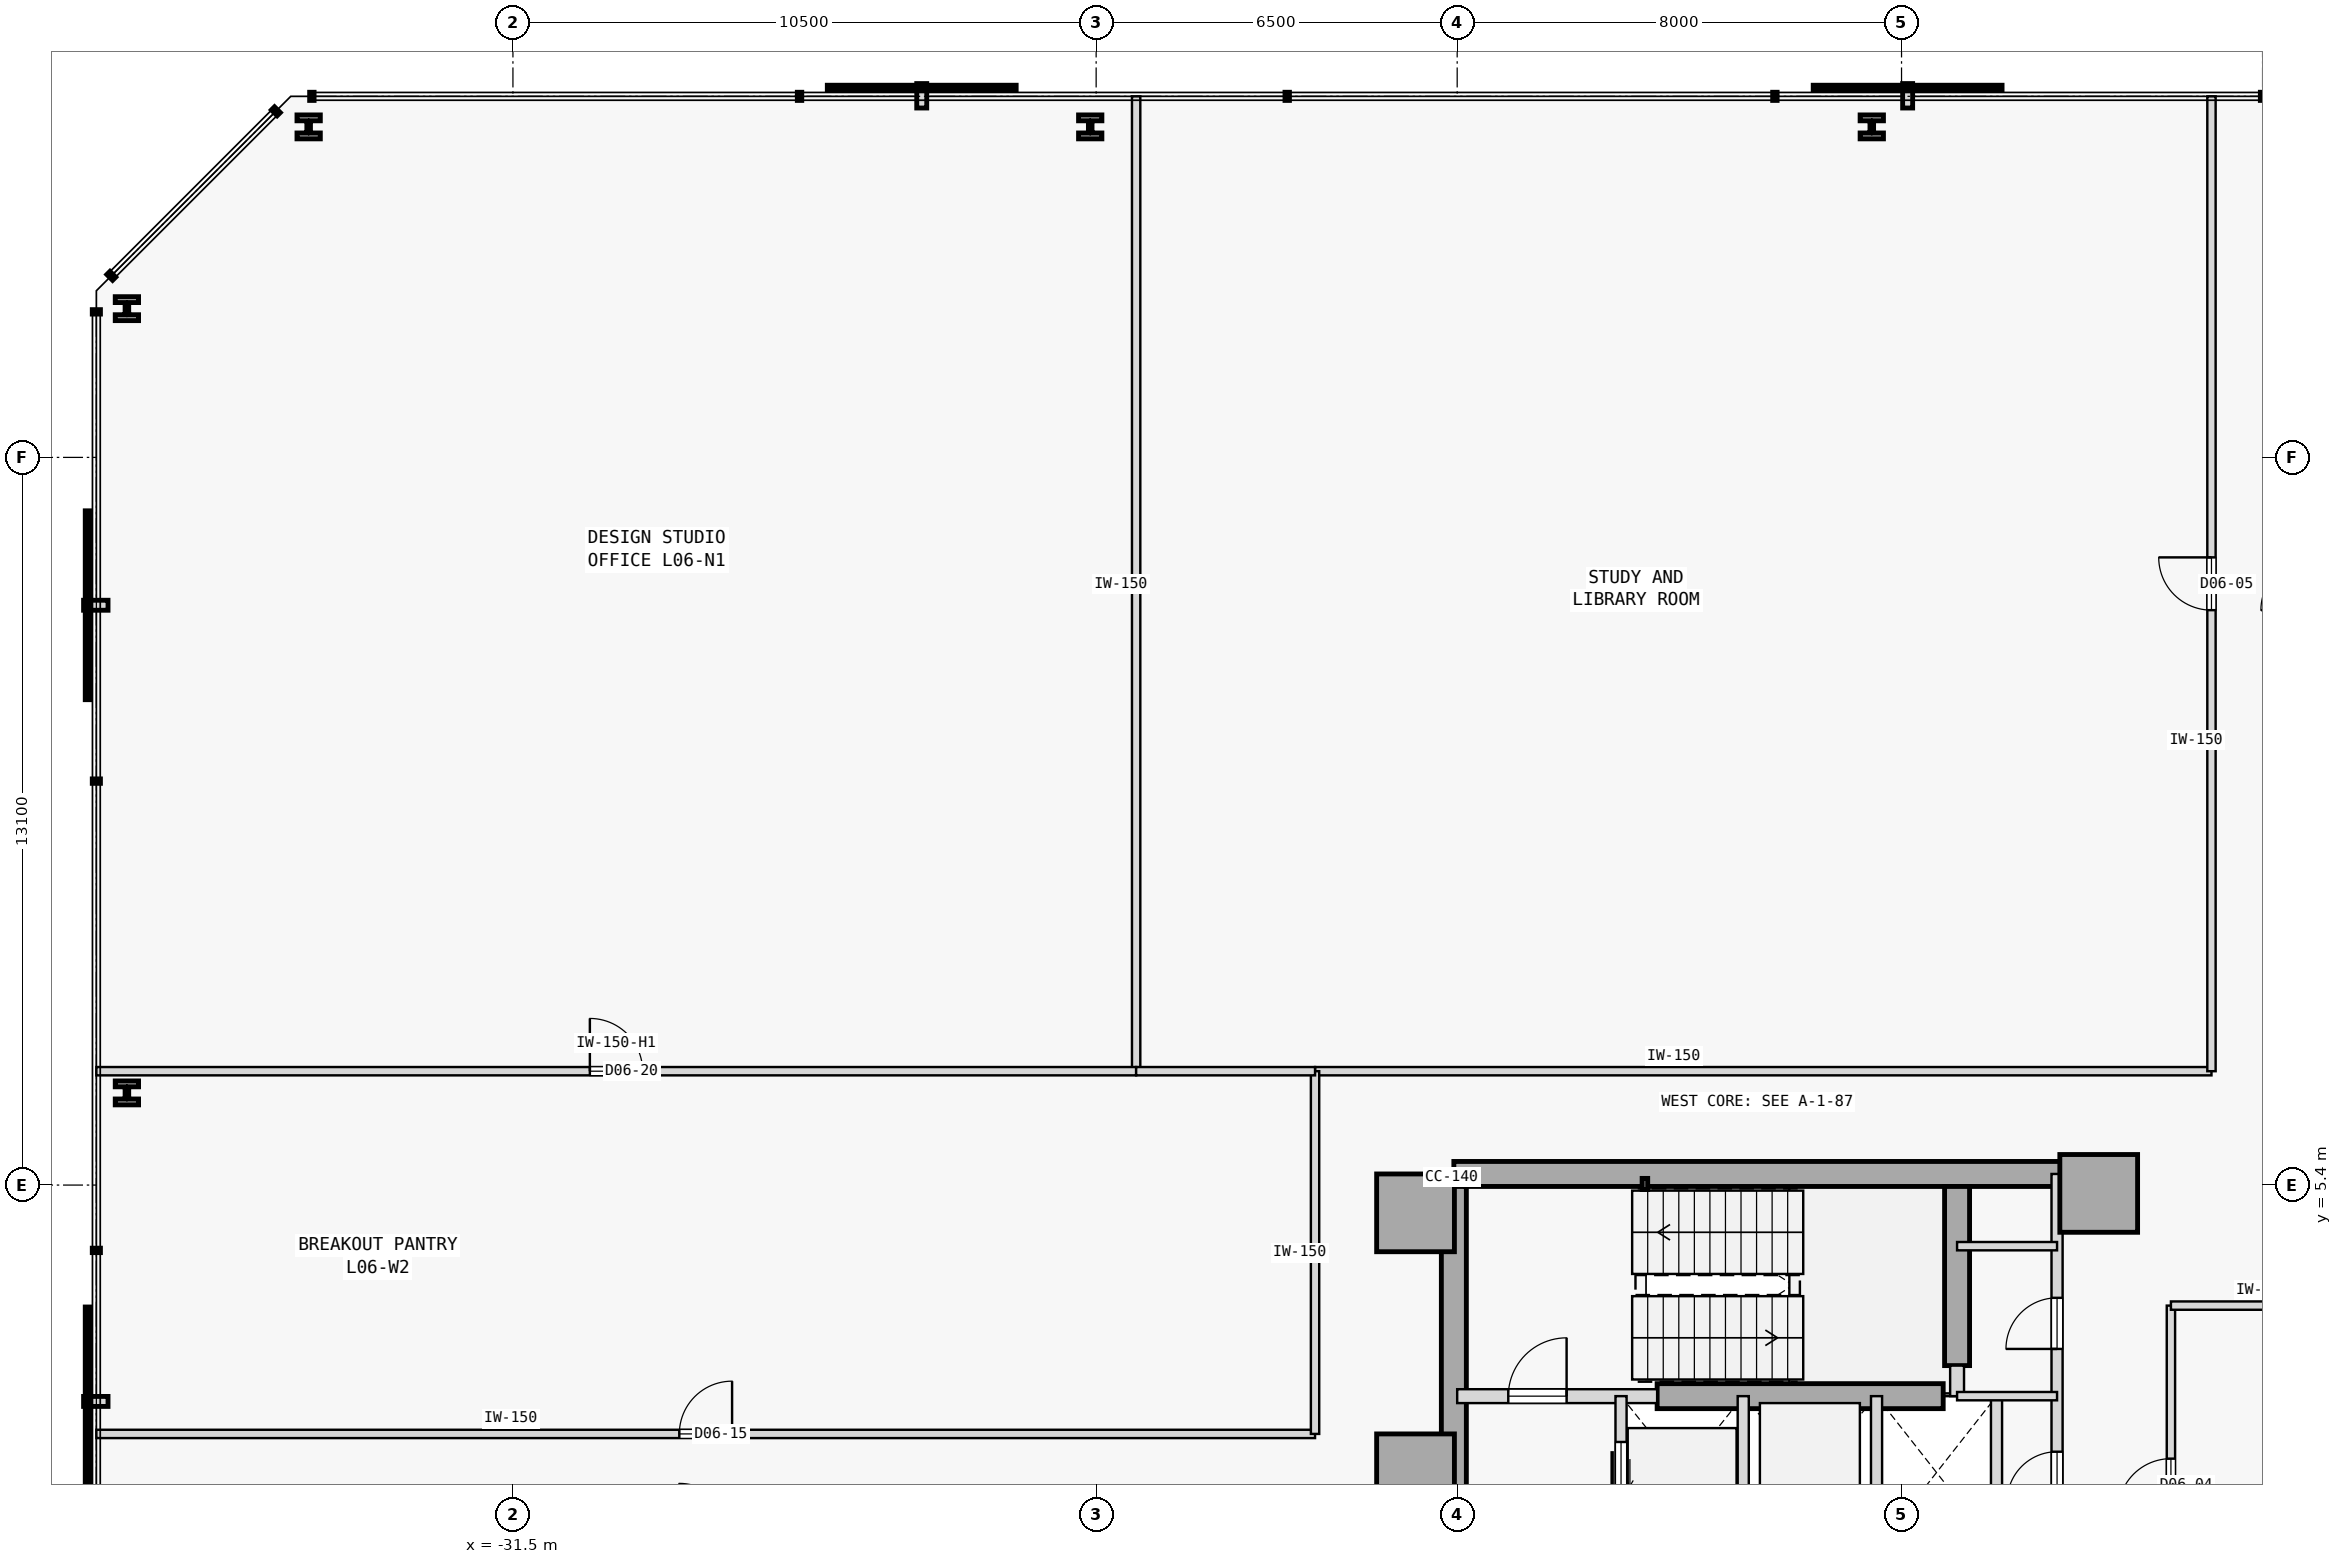
"""IFC4 building model, lengths in metres.
Left out: names, types, materials, properties, quantities, classifications, styles, units other than length and angle.
Written with IfcOpenShell. Run it as: python <this file> out.ifc"""

import sys

from ifc_helpers import new_model, si_unit, direction, frame, frame_2d, origin, origin_2d, place, context, subcontext, project, spatial, rectangle, hollow_rectangle, i_section, extrude, element, fill, save


model = new_model("IFC4")
c1 = context("Model", 3, precision=1e-05, world=origin(), true_north=direction((0.0, 1.0)))
c2 = subcontext(c1, "Body", "Model", "MODEL_VIEW")
j1 = project(units=[si_unit("LENGTHUNIT", "METRE"), si_unit("PLANEANGLEUNIT", "RADIAN")], contexts=[c1])
p1 = place(None, origin())
s1 = spatial("IfcSite", under=j1, at=p1, CompositionType="ELEMENT")
p2 = place(p1, origin())
s2 = spatial("IfcBuilding", under=s1, at=p2, CompositionType="ELEMENT")
p3 = place(p2, frame((0.0, 0.0, 29.4)))
s3 = spatial("IfcBuildingStorey", under=s2, at=p3, CompositionType="ELEMENT", Elevation=29.4)
for number, where, z_axis, x_axis in (
    (1, (-15.25, 4.9, 0.0), (0.0, 0.0, 1.0), (1.0, 0.0, 0.0)),
    (2, (-15.25, 0.22, 0.0), (0.0, 0.0, 1.0), (1.0, 0.0, 0.0)),
    (3, (-2.95, 5.25, 0.0), (0.0, 0.0, 1.0), (1.0, 0.0, 0.0)),
):
    element("IfcColumn", number, at=place(p3, frame(where, z_axis=z_axis, x_axis=x_axis)), inside=s3, PredefinedType="COLUMN", context=c2, shape_type="SweptSolid", body=[
        extrude(rectangle(XDim=1.4, YDim=1.4, at=origin_2d()), origin(), (0.0, 0.0, 1.0), 3.8),
    ])
p4 = place(p3, frame((-14.56, 5.6, 0.0), z_axis=(0.0, 0.0, 1.0), x_axis=(1.0, 0.0, 0.0)))
e4 = element("IfcWall", 4, at=p4, inside=s3, PredefinedType="SHEAR", context=c2, shape_type="SweptSolid", body=[
    extrude(rectangle(XDim=11.41, YDim=0.45, at=frame_2d((5.705, 0.0))), origin(), (0.0, 0.0, 1.0), 3.575),
])
p5 = place(p3, frame((-14.56, -5.375, 0.0), z_axis=(0.0, 0.0, 1.0), x_axis=(0.0, 1.0, 0.0)))
e5 = element("IfcWall", 5, at=p5, inside=s3, PredefinedType="SHEAR", context=c2, shape_type="SweptSolid", body=[
    extrude(rectangle(XDim=10.75, YDim=0.45, at=frame_2d((5.375, 0.0))), origin(), (0.0, 0.0, 1.0), 3.575),
])
p6 = place(p3, frame((-5.5, 2.15, 0.0), z_axis=(0.0, 0.0, 1.0), x_axis=(0.0, 1.0, 0.0)))
e6 = element("IfcWall", 6, at=p6, inside=s3, PredefinedType="SHEAR", context=c2, shape_type="SweptSolid", body=[
    extrude(rectangle(XDim=3.225, YDim=0.45, at=frame_2d((1.613, 0.0))), origin(), (0.0, 0.0, 1.0), 3.575),
])
p7 = place(p3, frame((-10.9, 1.6, 0.0), z_axis=(0.0, 0.0, 1.0), x_axis=(1.0, 0.0, 0.0)))
e7 = element("IfcWall", 7, at=p7, inside=s3, PredefinedType="SHEAR", context=c2, shape_type="SweptSolid", body=[
    extrude(rectangle(XDim=5.15, YDim=0.45, at=frame_2d((2.575, 0.0))), origin(), (0.0, 0.0, 1.0), 3.575),
])
p8 = place(p3, frame((-11.12, 5.42, 0.0), z_axis=(0.0, 0.0, 1.0), x_axis=(1.0, 0.0, 0.0)))
e8 = element("IfcColumn", 8, at=p8, inside=s3, PredefinedType="COLUMN", context=c2, shape_type="SweptSolid", body=[
    extrude(hollow_rectangle(XDim=0.1, YDim=0.2, WallThickness=0.008, at=origin_2d()), origin(), (0.0, 0.0, 1.0), 3.8),
])
for number, where, z_axis, x_axis in (
    (9, (-7.036, 24.45, 0.0), (0.0, 0.0, 1.0), (1.0, 0.0, 0.0)),
    (10, (-21.107, 24.45, 0.0), (0.0, 0.0, 1.0), (1.0, 0.0, 0.0)),
    (11, (-35.178, 24.45, 0.0), (0.0, 0.0, 1.0), (1.0, 0.0, 0.0)),
    (12, (-38.45, 21.178, 0.0), (0.0, 0.0, 1.0), (1.0, 0.0, 0.0)),
    (13, (-38.45, 7.059, 0.0), (0.0, 0.0, 1.0), (1.0, 0.0, 0.0)),
):
    element("IfcColumn", number, at=place(p3, frame(where, z_axis=z_axis, x_axis=x_axis)), inside=s3, PredefinedType="COLUMN", context=c2, shape_type="SweptSolid", body=[
        extrude(i_section(OverallWidth=0.42, OverallDepth=0.431, WebThickness=0.065, FlangeThickness=0.106, FilletRadius=0.015, at=origin_2d()), origin(), (0.0, 0.0, 1.0), 3.8),
    ])
p9 = place(p3, frame((-14.5, 1.6, 0.0), z_axis=(0.0, 0.0, 1.0), x_axis=(1.0, 0.0, 0.0)))
e14 = element("IfcWall", 14, at=p9, inside=s3, PredefinedType="STANDARD", context=c2, shape_type="SweptSolid", body=[
    extrude(rectangle(XDim=3.6, YDim=0.25, at=frame_2d((1.8, 0.0))), origin(), (0.0, 0.0, 1.0), 3.575),
])
p10 = place(p9, frame((0.92, 0.0, 0.0)))
e15 = element("IfcOpeningElement", 15, at=p10, cuts=e14, PredefinedType="OPENING", context=c2, shape_type="SweptSolid", body=[
    extrude(rectangle(XDim=1.05, YDim=2.15, at=frame_2d((0.525, 1.075))), frame((0.0, 0.135, 0.0), z_axis=(0.0, -1.0, 0.0), x_axis=(1.0, 0.0, 0.0)), (0.0, 0.0, 1.0), 0.27),
])
p11 = place(p3, frame((-5.5, 1.6, 0.0), z_axis=(0.0, 0.0, 1.0), x_axis=(0.0, 1.0, 0.0)))
e16 = element("IfcWall", 16, at=p11, inside=s3, PredefinedType="STANDARD", context=c2, shape_type="SweptSolid", body=[
    extrude(rectangle(XDim=0.55, YDim=0.25, at=frame_2d((0.275, 0.0))), origin(), (0.0, 0.0, 1.0), 3.575),
])
p12 = place(p3, frame((-3.7, -1.15, 0.0), z_axis=(0.0, 0.0, 1.0), x_axis=(0.0, 1.0, 0.0)))
e17 = element("IfcWall", 17, at=p12, inside=s3, PredefinedType="STANDARD", context=c2, shape_type="SweptSolid", body=[
    extrude(rectangle(XDim=6.75, YDim=0.2, at=frame_2d((3.375, 0.0))), origin(), (0.0, 0.0, 1.0), 3.575),
])
p13 = place(p12, frame((3.6, 0.0, 0.0)))
e18 = element("IfcOpeningElement", 18, at=p13, cuts=e17, PredefinedType="OPENING", context=c2, shape_type="SweptSolid", body=[
    extrude(rectangle(XDim=0.92, YDim=2.15, at=frame_2d((0.46, 1.075))), frame((0.0, 0.11, 0.0), z_axis=(0.0, -1.0, 0.0), x_axis=(1.0, 0.0, 0.0)), (0.0, 0.0, 1.0), 0.22),
])
p14 = place(p12, frame((0.85, 0.0, 0.0)))
e19 = element("IfcOpeningElement", 19, at=p14, cuts=e17, PredefinedType="OPENING", context=c2, shape_type="SweptSolid", body=[
    extrude(rectangle(XDim=0.9, YDim=2.15, at=frame_2d((0.45, 1.075))), frame((0.0, 0.11, 0.0), z_axis=(0.0, -1.0, 0.0), x_axis=(1.0, 0.0, 0.0)), (0.0, 0.0, 1.0), 0.22),
])
p15 = place(p3, frame((-11.55, -1.15, 0.0), z_axis=(0.0, 0.0, 1.0), x_axis=(0.0, 1.0, 0.0)))
e20 = element("IfcWall", 20, at=p15, inside=s3, PredefinedType="STANDARD", context=c2, shape_type="SweptSolid", body=[
    extrude(rectangle(XDim=2.75, YDim=0.2, at=frame_2d((1.375, 0.0))), origin(), (0.0, 0.0, 1.0), 3.575),
])
p16 = place(p15, frame((0.825, 0.0, 0.0)))
e21 = element("IfcOpeningElement", 21, at=p16, cuts=e20, PredefinedType="OPENING", context=c2, shape_type="SweptSolid", body=[
    extrude(rectangle(XDim=1.1, YDim=2.15, at=frame_2d((0.55, 1.075))), frame((0.0, 0.11, 0.0), z_axis=(0.0, -1.0, 0.0), x_axis=(1.0, 0.0, 0.0)), (0.0, 0.0, 1.0), 0.22),
])
for number, where, z_axis, x_axis in (
    (22, (-9.35, -1.15, 0.0), (0.0, 0.0, 1.0), (0.0, 1.0, 0.0)),
    (23, (-6.95, -1.15, 0.0), (0.0, 0.0, 1.0), (0.0, 1.0, 0.0)),
    (24, (-4.79, -1.15, 0.0), (0.0, 0.0, 1.0), (0.0, 1.0, 0.0)),
):
    element("IfcWall", number, at=place(p3, frame(where, z_axis=z_axis, x_axis=x_axis)), inside=s3, PredefinedType="STANDARD", context=c2, shape_type="SweptSolid", body=[
        extrude(rectangle(XDim=2.75, YDim=0.2, at=frame_2d((1.375, 0.0))), origin(), (0.0, 0.0, 1.0), 3.575),
    ])
for number, where, z_axis, x_axis in (
    (25, (-5.5, 4.3, 0.0), (0.0, 0.0, 1.0), (1.0, 0.0, 0.0)),
    (26, (-5.5, 1.6, 0.0), (0.0, 0.0, 1.0), (1.0, 0.0, 0.0)),
):
    element("IfcWall", number, at=place(p3, frame(where, z_axis=z_axis, x_axis=x_axis)), inside=s3, PredefinedType="PARTITIONING", context=c2, shape_type="SweptSolid", body=[
        extrude(rectangle(XDim=1.8, YDim=0.15, at=frame_2d((0.9, 0.0))), origin(), (0.0, 0.0, 1.0), 3.575),
    ])
p17 = place(p3, frame((-1.65, -3.23, 0.0), z_axis=(0.0, 0.0, 1.0), x_axis=(0.0, 1.0, 0.0)))
e27 = element("IfcWall", 27, at=p17, inside=s3, PredefinedType="PARTITIONING", context=c2, shape_type="SweptSolid", body=[
    extrude(rectangle(XDim=6.46, YDim=0.15, at=frame_2d((3.23, 0.0))), origin(), (0.0, 0.0, 1.0), 3.575),
])
p18 = place(p17, frame((2.755, 0.0, 0.0)))
e28 = element("IfcOpeningElement", 28, at=p18, cuts=e27, PredefinedType="OPENING", context=c2, shape_type="SweptSolid", body=[
    extrude(rectangle(XDim=0.95, YDim=2.15, at=frame_2d((0.475, 1.075))), frame((0.0, 0.085, 0.0), z_axis=(0.0, -1.0, 0.0), x_axis=(1.0, 0.0, 0.0)), (0.0, 0.0, 1.0), 0.17),
])
p19 = place(p3, frame((-1.65, 3.23, 0.0), z_axis=(0.0, 0.0, 1.0), x_axis=(1.0, 0.0, 0.0)))
e29 = element("IfcWall", 29, at=p19, inside=s3, PredefinedType="PARTITIONING", context=c2, shape_type="SweptSolid", body=[
    extrude(rectangle(XDim=3.3, YDim=0.15, at=frame_2d((1.65, 0.0))), origin(), (0.0, 0.0, 1.0), 3.575),
])
p20 = place(p3, frame((-17.059, 7.45, 0.0), z_axis=(0.0, 0.0, 1.0), x_axis=(1.0, 0.0, 0.0)))
e30 = element("IfcWall", 30, at=p20, inside=s3, PredefinedType="PARTITIONING", context=c2, shape_type="SweptSolid", body=[
    extrude(rectangle(XDim=16.139, YDim=0.15, at=frame_2d((8.07, 0.0))), origin(), (0.0, 0.0, 1.0), 3.575),
])
p21 = place(p3, frame((-0.92, 7.45, 0.0), z_axis=(0.0, 0.0, 1.0), x_axis=(0.0, 1.0, 0.0)))
e31 = element("IfcWall", 31, at=p21, inside=s3, PredefinedType="PARTITIONING", context=c2, shape_type="SweptSolid", body=[
    extrude(rectangle(XDim=17.55, YDim=0.15, at=frame_2d((8.775, 0.0))), origin(), (0.0, 0.0, 1.0), 3.575),
])
p22 = place(p21, frame((8.3, 0.0, 0.0)))
e32 = element("IfcOpeningElement", 32, at=p22, cuts=e31, PredefinedType="OPENING", context=c2, shape_type="SweptSolid", body=[
    extrude(rectangle(XDim=0.95, YDim=2.15, at=frame_2d((0.475, 1.075))), frame((0.0, 0.085, 0.0), z_axis=(0.0, -1.0, 0.0), x_axis=(1.0, 0.0, 0.0)), (0.0, 0.0, 1.0), 0.17),
])
p23 = place(p3, frame((-39.0, 0.92, 0.0), z_axis=(0.0, 0.0, 1.0), x_axis=(1.0, 0.0, 0.0)))
e33 = element("IfcWall", 33, at=p23, inside=s3, PredefinedType="PARTITIONING", context=c2, shape_type="SweptSolid", body=[
    extrude(rectangle(XDim=21.941, YDim=0.15, at=frame_2d((10.97, 0.0))), origin(), (0.0, 0.0, 1.0), 3.575),
])
p24 = place(p23, frame((10.496, 0.0, 0.0)))
e34 = element("IfcOpeningElement", 34, at=p24, cuts=e33, PredefinedType="OPENING", context=c2, shape_type="SweptSolid", body=[
    extrude(rectangle(XDim=0.95, YDim=2.15, at=frame_2d((0.475, 1.075))), frame((0.0, 0.085, 0.0), z_axis=(0.0, -1.0, 0.0), x_axis=(1.0, 0.0, 0.0)), (0.0, 0.0, 1.0), 0.17),
])
p25 = place(p3, frame((-17.059, 0.92, 0.0), z_axis=(0.0, 0.0, 1.0), x_axis=(0.0, 1.0, 0.0)))
e35 = element("IfcWall", 35, at=p25, inside=s3, PredefinedType="PARTITIONING", context=c2, shape_type="SweptSolid", body=[
    extrude(rectangle(XDim=6.53, YDim=0.15, at=frame_2d((3.265, 0.0))), origin(), (0.0, 0.0, 1.0), 3.575),
])
p26 = place(p3, frame((-20.28, 7.45, 0.0), z_axis=(0.0, 0.0, 1.0), x_axis=(0.0, 1.0, 0.0)))
e36 = element("IfcWall", 36, at=p26, inside=s3, PredefinedType="PARTITIONING", context=c2, shape_type="SweptSolid", body=[
    extrude(rectangle(XDim=17.55, YDim=0.15, at=frame_2d((8.775, 0.0))), origin(), (0.0, 0.0, 1.0), 3.575),
])
p27 = place(p3, frame((-39.0, 7.45, 0.0), z_axis=(0.0, 0.0, 1.0), x_axis=(1.0, 0.0, 0.0)))
e37 = element("IfcWall", 37, at=p27, inside=s3, PredefinedType="PARTITIONING", context=c2, shape_type="SweptSolid", body=[
    extrude(rectangle(XDim=18.72, YDim=0.15, at=frame_2d((9.36, 0.0))), origin(), (0.0, 0.0, 1.0), 3.125),
])
p28 = place(p27, frame((8.885, 0.0, 0.0)))
e38 = element("IfcOpeningElement", 38, at=p28, cuts=e37, PredefinedType="OPENING", context=c2, shape_type="SweptSolid", body=[
    extrude(rectangle(XDim=0.95, YDim=2.15, at=frame_2d((0.475, 1.075))), frame((0.0, 0.085, 0.0), z_axis=(0.0, -1.0, 0.0), x_axis=(1.0, 0.0, 0.0)), (0.0, 0.0, 1.0), 0.17),
])
p29 = place(p3, frame((-20.28, 7.45, 0.0), z_axis=(0.0, 0.0, 1.0), x_axis=(1.0, 0.0, 0.0)))
e39 = element("IfcWall", 39, at=p29, inside=s3, PredefinedType="PARTITIONING", context=c2, shape_type="SweptSolid", body=[
    extrude(rectangle(XDim=3.221, YDim=0.15, at=frame_2d((1.61, 0.0))), origin(), (0.0, 0.0, 1.0), 3.575),
])
p30 = place(p10, origin())
e40 = element("IfcDoor", 40, at=p30, inside=s3, OperationType="SINGLE_SWING_RIGHT", PredefinedType="DOOR", context=c2, shape_type="SweptSolid", body=[
    extrude(rectangle(XDim=1.05, YDim=2.15, at=frame_2d((0.525, 1.075))), frame((0.0, 0.025, 0.0), z_axis=(0.0, -1.0, 0.0), x_axis=(1.0, 0.0, 0.0)), (0.0, 0.0, 1.0), 0.05),
])
fill(e15, e40)
p31 = place(p16, origin())
e41 = element("IfcDoor", 41, at=p31, inside=s3, OperationType="SLIDING_TO_RIGHT", PredefinedType="DOOR", context=c2, shape_type="SweptSolid", body=[
    extrude(rectangle(XDim=1.1, YDim=2.15, at=frame_2d((0.55, 1.075))), frame((0.0, 0.025, 0.0), z_axis=(0.0, -1.0, 0.0), x_axis=(1.0, 0.0, 0.0)), (0.0, 0.0, 1.0), 0.05),
])
fill(e21, e41)
p32 = place(p13, origin())
e42 = element("IfcDoor", 42, at=p32, inside=s3, OperationType="SINGLE_SWING_LEFT", PredefinedType="DOOR", context=c2, shape_type="SweptSolid", body=[
    extrude(rectangle(XDim=0.92, YDim=2.15, at=frame_2d((0.46, 1.075))), frame((0.0, 0.025, 0.0), z_axis=(0.0, -1.0, 0.0), x_axis=(1.0, 0.0, 0.0)), (0.0, 0.0, 1.0), 0.05),
])
fill(e18, e42)
p33 = place(p14, origin())
e43 = element("IfcDoor", 43, at=p33, inside=s3, OperationType="SINGLE_SWING_LEFT", PredefinedType="DOOR", context=c2, shape_type="SweptSolid", body=[
    extrude(rectangle(XDim=0.9, YDim=2.15, at=frame_2d((0.45, 1.075))), frame((0.0, 0.025, 0.0), z_axis=(0.0, -1.0, 0.0), x_axis=(1.0, 0.0, 0.0)), (0.0, 0.0, 1.0), 0.05),
])
fill(e19, e43)
p34 = place(p18, origin())
e44 = element("IfcDoor", 44, at=p34, inside=s3, OperationType="SINGLE_SWING_LEFT", PredefinedType="DOOR", context=c2, shape_type="SweptSolid", body=[
    extrude(rectangle(XDim=0.95, YDim=2.15, at=frame_2d((0.475, 1.075))), frame((0.0, 0.025, 0.0), z_axis=(0.0, -1.0, 0.0), x_axis=(1.0, 0.0, 0.0)), (0.0, 0.0, 1.0), 0.05),
])
fill(e28, e44)
p35 = place(p22, origin())
e45 = element("IfcDoor", 45, at=p35, inside=s3, OperationType="SINGLE_SWING_RIGHT", PredefinedType="DOOR", context=c2, shape_type="SweptSolid", body=[
    extrude(rectangle(XDim=0.95, YDim=2.15, at=frame_2d((0.475, 1.075))), frame((0.0, 0.025, 0.0), z_axis=(0.0, -1.0, 0.0), x_axis=(1.0, 0.0, 0.0)), (0.0, 0.0, 1.0), 0.05),
])
fill(e32, e45)
p36 = place(p24, origin())
e46 = element("IfcDoor", 46, at=p36, inside=s3, OperationType="SINGLE_SWING_RIGHT", PredefinedType="DOOR", context=c2, shape_type="SweptSolid", body=[
    extrude(rectangle(XDim=0.95, YDim=2.15, at=frame_2d((0.475, 1.075))), frame((0.0, 0.025, 0.0), z_axis=(0.0, -1.0, 0.0), x_axis=(1.0, 0.0, 0.0)), (0.0, 0.0, 1.0), 0.05),
])
fill(e34, e46)
p37 = place(p28, origin())
e47 = element("IfcDoor", 47, at=p37, inside=s3, OperationType="SINGLE_SWING_LEFT", PredefinedType="DOOR", context=c2, shape_type="SweptSolid", body=[
    extrude(rectangle(XDim=0.95, YDim=2.15, at=frame_2d((0.475, 1.075))), frame((0.0, 0.025, 0.0), z_axis=(0.0, -1.0, 0.0), x_axis=(1.0, 0.0, 0.0)), (0.0, 0.0, 1.0), 0.05),
])
fill(e38, e47)
save(model, sys.argv[1])
